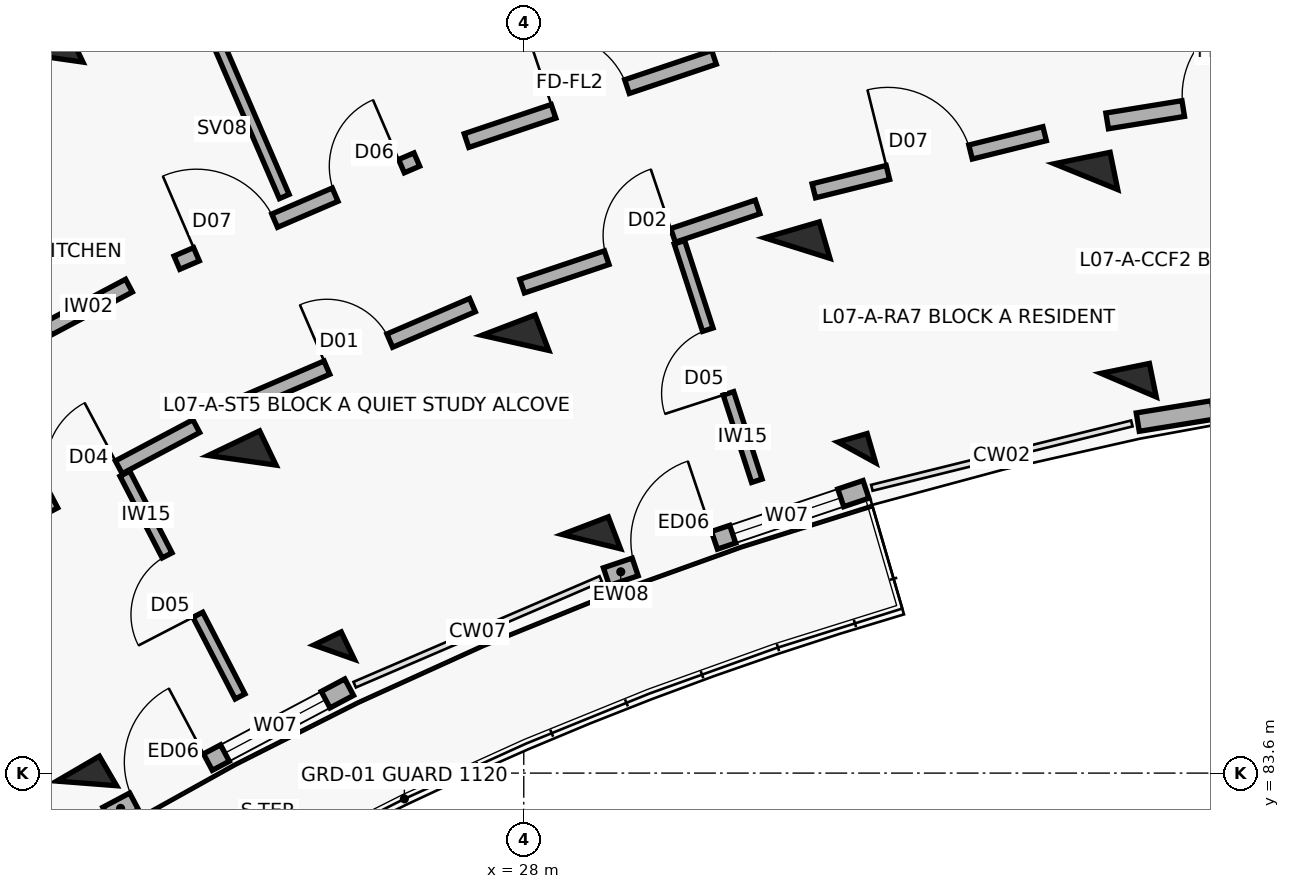
"""IFC4 building model, lengths in metres.
Left out: names, types, materials, properties, quantities, classifications, styles, units other than length and angle.
Written with IfcOpenShell. Run it as: python <this file> out.ifc"""

import sys

from ifc_helpers import new_model, si_unit, direction, frame, frame_2d, origin, origin_2d, place, context, subcontext, project, spatial, rectangle, extrude, element, fill, save


model = new_model("IFC4")
c1 = context("Model", 3, precision=1e-05, world=origin(), true_north=direction((0.0, 1.0)))
c2 = subcontext(c1, "Body", "Model", "MODEL_VIEW")
j1 = project(units=[si_unit("LENGTHUNIT", "METRE"), si_unit("PLANEANGLEUNIT", "RADIAN")], contexts=[c1])
p1 = place(None, origin())
s1 = spatial("IfcSite", under=j1, at=p1, CompositionType="ELEMENT")
p2 = place(p1, origin())
s2 = spatial("IfcBuilding", under=s1, at=p2, CompositionType="ELEMENT")
p3 = place(p2, frame((0.0, 0.0, 23.6)))
s3 = spatial("IfcBuildingStorey", under=s2, at=p3, CompositionType="ELEMENT", Elevation=23.6)
p4 = place(p3, frame((22.249, 83.464, 0.0), z_axis=(0.0, 0.0, 1.0), x_axis=(-0.504226211181, 0.863571611366, 0.0)))
e1 = element("IfcColumn", 1, at=p4, inside=s3, PredefinedType="COLUMN", context=c2, shape_type="SweptSolid", body=[
    extrude(rectangle(XDim=0.45, YDim=0.65, at=origin_2d()), origin(), (0.0, 0.0, 1.0), 3.1),
])
p5 = place(p3, frame((25.504, 85.191, 0.0), z_axis=(0.0, 0.0, 1.0), x_axis=(-0.432085748802, 0.901832526405, 0.0)))
e2 = element("IfcColumn", 2, at=p5, inside=s3, PredefinedType="COLUMN", context=c2, shape_type="SweptSolid", body=[
    extrude(rectangle(XDim=0.4, YDim=0.4, at=origin_2d()), origin(), (0.0, 0.0, 1.0), 3.1),
])
for number, where, z_axis, x_axis in (
    (3, (24.294, 87.716, 0.0), (0.0, 0.0, 1.0), (-0.432, 0.902, 0.0)),
    (4, (21.754, 93.019, 0.0), (0.0, 0.0, 1.0), (-0.432, 0.902, 0.0)),
):
    element("IfcColumn", number, at=place(p3, frame(where, z_axis=z_axis, x_axis=x_axis)), inside=s3, PredefinedType="COLUMN", context=c2, shape_type="SweptSolid", body=[
        extrude(rectangle(XDim=0.5, YDim=0.75, at=origin_2d()), origin(), (0.0, 0.0, 1.0), 3.1),
    ])
p6 = place(p3, frame((28.889, 86.646, 0.0), z_axis=(0.0, 0.0, 1.0), x_axis=(-0.357064076459, 0.934079892355, 0.0)))
e5 = element("IfcColumn", 5, at=p6, inside=s3, PredefinedType="COLUMN", context=c2, shape_type="SweptSolid", body=[
    extrude(rectangle(XDim=0.45, YDim=0.65, at=origin_2d()), origin(), (0.0, 0.0, 1.0), 3.1),
])
p7 = place(p3, frame((27.889, 89.261, 0.0), z_axis=(0.0, 0.0, 1.0), x_axis=(-0.357064076459, 0.934079892355, 0.0)))
e6 = element("IfcColumn", 6, at=p7, inside=s3, PredefinedType="COLUMN", context=c2, shape_type="SweptSolid", body=[
    extrude(rectangle(XDim=0.5, YDim=0.75, at=origin_2d()), origin(), (0.0, 0.0, 1.0), 3.1),
])
p8 = place(p3, frame((32.382, 87.82, 0.0), z_axis=(0.0, 0.0, 1.0), x_axis=(-0.27966144946, 0.96009867914, 0.0)))
e7 = element("IfcColumn", 7, at=p8, inside=s3, PredefinedType="COLUMN", context=c2, shape_type="SweptSolid", body=[
    extrude(rectangle(XDim=0.4, YDim=0.4, at=origin_2d()), origin(), (0.0, 0.0, 1.0), 3.1),
])
p9 = place(p3, frame((31.599, 90.508, 0.0), z_axis=(0.0, 0.0, 1.0), x_axis=(-0.27966144946, 0.96009867914, 0.0)))
e8 = element("IfcColumn", 8, at=p9, inside=s3, PredefinedType="COLUMN", context=c2, shape_type="SweptSolid", body=[
    extrude(rectangle(XDim=0.5, YDim=0.75, at=origin_2d()), origin(), (0.0, 0.0, 1.0), 3.1),
])
p10 = place(p3, frame((35.958, 88.705, 0.0), z_axis=(0.0, 0.0, 1.0), x_axis=(-0.200393999665, 0.979715389742, 0.0)))
e9 = element("IfcColumn", 9, at=p10, inside=s3, PredefinedType="COLUMN", context=c2, shape_type="SweptSolid", body=[
    extrude(rectangle(XDim=0.45, YDim=0.65, at=origin_2d()), origin(), (0.0, 0.0, 1.0), 3.1),
])
p11 = place(p3, frame((35.397, 91.448, 0.0), z_axis=(0.0, 0.0, 1.0), x_axis=(-0.200393999665, 0.979715389742, 0.0)))
e10 = element("IfcColumn", 10, at=p11, inside=s3, PredefinedType="COLUMN", context=c2, shape_type="SweptSolid", body=[
    extrude(rectangle(XDim=0.5, YDim=0.75, at=origin_2d()), origin(), (0.0, 0.0, 1.0), 3.1),
])
p12 = place(p3, frame((22.519, 83.042, 0.0), z_axis=(0.0, 0.0, 1.0), x_axis=(0.883438308286, 0.468547495407, 0.0)))
e11 = element("IfcWall", 11, at=p12, inside=s3, PredefinedType="SOLIDWALL", context=c2, shape_type="SweptSolid", body=[
    extrude(rectangle(XDim=3.604, YDim=0.245, at=frame_2d((1.802, 0.0))), origin(), (0.0, 0.0, 1.0), 2.25),
])
p13 = place(p12, frame((0.4, 0.0, 0.0)))
e12 = element("IfcOpeningElement", 12, at=p13, cuts=e11, PredefinedType="OPENING", context=c2, shape_type="SweptSolid", body=[
    extrude(rectangle(XDim=1.1, YDim=2.15, at=frame_2d((0.55, 1.075))), frame((0.0, 0.133, 0.0), z_axis=(0.0, -1.0, 0.0), x_axis=(1.0, 0.0, 0.0)), (0.0, 0.0, 1.0), 0.265),
])
p14 = place(p12, frame((1.754, 0.0, 0.35)))
e13 = element("IfcOpeningElement", 13, at=p14, cuts=e11, PredefinedType="OPENING", context=c2, shape_type="SweptSolid", body=[
    extrude(rectangle(XDim=1.5, YDim=1.65, at=frame_2d((0.75, 0.825))), frame((0.0, 0.133, 0.0), z_axis=(0.0, -1.0, 0.0), x_axis=(1.0, 0.0, 0.0)), (0.0, 0.0, 1.0), 0.265),
])
p15 = place(p3, frame((29.087, 86.185, 0.0), z_axis=(0.0, 0.0, 1.0), x_axis=(0.947880824442, 0.318625081649, 0.0)))
e14 = element("IfcWall", 14, at=p15, inside=s3, PredefinedType="SOLIDWALL", context=c2, shape_type="SweptSolid", body=[
    extrude(rectangle(XDim=3.604, YDim=0.245, at=frame_2d((1.802, 0.0))), origin(), (0.0, 0.0, 1.0), 2.25),
])
p16 = place(p15, frame((0.4, 0.0, 0.0)))
e15 = element("IfcOpeningElement", 15, at=p16, cuts=e14, PredefinedType="OPENING", context=c2, shape_type="SweptSolid", body=[
    extrude(rectangle(XDim=1.1, YDim=2.15, at=frame_2d((0.55, 1.075))), frame((0.0, 0.133, 0.0), z_axis=(0.0, -1.0, 0.0), x_axis=(1.0, 0.0, 0.0)), (0.0, 0.0, 1.0), 0.265),
])
p17 = place(p15, frame((1.754, 0.0, 0.35)))
e16 = element("IfcOpeningElement", 16, at=p17, cuts=e14, PredefinedType="OPENING", context=c2, shape_type="SweptSolid", body=[
    extrude(rectangle(XDim=1.5, YDim=1.65, at=frame_2d((0.75, 0.825))), frame((0.0, 0.133, 0.0), z_axis=(0.0, -1.0, 0.0), x_axis=(1.0, 0.0, 0.0)), (0.0, 0.0, 1.0), 0.265),
])
p18 = place(p3, frame((36.078, 88.218, 0.0), z_axis=(0.0, 0.0, 1.0), x_axis=(0.987080874485, 0.160222804952, 0.0)))
e17 = element("IfcWall", 17, at=p18, inside=s3, PredefinedType="SOLIDWALL", context=c2, shape_type="SweptSolid", body=[
    extrude(rectangle(XDim=3.604, YDim=0.245, at=frame_2d((1.802, 0.0))), origin(), (0.0, 0.0, 1.0), 2.25),
])
p19 = place(p18, frame((1.002, 0.0, 0.32)))
e18 = element("IfcOpeningElement", 18, at=p19, cuts=e17, PredefinedType="OPENING", context=c2, shape_type="SweptSolid", body=[
    extrude(rectangle(XDim=1.6, YDim=1.5, at=frame_2d((0.8, 0.75))), frame((0.0, 0.133, 0.0), z_axis=(0.0, -1.0, 0.0), x_axis=(1.0, 0.0, 0.0)), (0.0, 0.0, 1.0), 0.265),
])
p20 = place(p3, frame((19.77, 88.404, 0.0), z_axis=(0.0, 0.0, 1.0), x_axis=(0.883410853063, 0.468599258099, 0.0)))
e19 = element("IfcWall", 19, at=p20, inside=s3, PredefinedType="SOLIDWALL", context=c2, shape_type="SweptSolid", body=[
    extrude(rectangle(XDim=3.436, YDim=0.19, at=frame_2d((1.718, 0.0))), origin(), (0.0, 0.0, 1.0), 2.08),
])
p21 = place(p20, frame((1.208, 0.0, 0.0)))
e20 = element("IfcOpeningElement", 20, at=p21, cuts=e19, PredefinedType="OPENING", context=c2, shape_type="SweptSolid", body=[
    extrude(rectangle(XDim=1.02, YDim=2.15, at=frame_2d((0.51, 1.075))), frame((0.0, 0.105, 0.0), z_axis=(0.0, -1.0, 0.0), x_axis=(1.0, 0.0, 0.0)), (0.0, 0.0, 1.0), 0.21),
])
p22 = place(p3, frame((20.804, 86.634, 0.0), z_axis=(0.0, 0.0, 1.0), x_axis=(0.883444301944, 0.468536194293, 0.0)))
e21 = element("IfcWall", 21, at=p22, inside=s3, PredefinedType="SOLIDWALL", context=c2, shape_type="SweptSolid", body=[
    extrude(rectangle(XDim=3.269, YDim=0.19, at=frame_2d((1.634, 0.0))), origin(), (0.0, 0.0, 1.0), 2.08),
])
p23 = place(p22, frame((1.154, 0.0, 0.0)))
e22 = element("IfcOpeningElement", 22, at=p23, cuts=e21, PredefinedType="OPENING", context=c2, shape_type="SweptSolid", body=[
    extrude(rectangle(XDim=0.96, YDim=2.1, at=frame_2d((0.48, 1.05))), frame((0.0, 0.105, 0.0), z_axis=(0.0, -1.0, 0.0), x_axis=(1.0, 0.0, 0.0)), (0.0, 0.0, 1.0), 0.21),
])
p24 = place(p3, frame((24.267, 84.608, 0.0), z_axis=(0.0, 0.0, 1.0), x_axis=(-0.459217611894, 0.888323806349, 0.0)))
e23 = element("IfcWall", 23, at=p24, inside=s3, PredefinedType="PARTITIONING", context=c2, shape_type="SweptSolid", body=[
    extrude(rectangle(XDim=3.3, YDim=0.145, at=frame_2d((1.65, 0.0))), origin(), (0.0, 0.0, 1.0), 2.08),
])
p25 = place(p24, frame((1.21, 0.0, 0.0)))
e24 = element("IfcOpeningElement", 24, at=p25, cuts=e23, PredefinedType="OPENING", context=c2, shape_type="SweptSolid", body=[
    extrude(rectangle(XDim=0.88, YDim=2.1, at=frame_2d((0.44, 1.05))), frame((0.0, 0.083, 0.0), z_axis=(0.0, -1.0, 0.0), x_axis=(1.0, 0.0, 0.0)), (0.0, 0.0, 1.0), 0.165),
])
p26 = place(p3, frame((23.437, 90.316, 0.0), z_axis=(0.0, 0.0, 1.0), x_axis=(0.918718172399, 0.394913813008, 0.0)))
e25 = element("IfcWall", 25, at=p26, inside=s3, PredefinedType="SOLIDWALL", context=c2, shape_type="SweptSolid", body=[
    extrude(rectangle(XDim=3.436, YDim=0.19, at=frame_2d((1.718, 0.0))), origin(), (0.0, 0.0, 1.0), 2.08),
])
p27 = place(p26, frame((0.28, 0.0, 0.0)))
e26 = element("IfcOpeningElement", 26, at=p27, cuts=e25, PredefinedType="OPENING", context=c2, shape_type="SweptSolid", body=[
    extrude(rectangle(XDim=1.12, YDim=2.15, at=frame_2d((0.56, 1.075))), frame((0.0, 0.105, 0.0), z_axis=(0.0, -1.0, 0.0), x_axis=(1.0, 0.0, 0.0)), (0.0, 0.0, 1.0), 0.21),
])
p28 = place(p26, frame((2.266, 0.0, 0.0)))
e27 = element("IfcOpeningElement", 27, at=p28, cuts=e25, PredefinedType="OPENING", context=c2, shape_type="SweptSolid", body=[
    extrude(rectangle(XDim=0.95, YDim=2.1, at=frame_2d((0.475, 1.05))), frame((0.0, 0.105, 0.0), z_axis=(0.0, -1.0, 0.0), x_axis=(1.0, 0.0, 0.0)), (0.0, 0.0, 1.0), 0.21),
])
p29 = place(p3, frame((24.322, 88.467, 0.0), z_axis=(0.0, 0.0, 1.0), x_axis=(0.918723391052, 0.394901672235, 0.0)))
e28 = element("IfcWall", 28, at=p29, inside=s3, PredefinedType="SOLIDWALL", context=c2, shape_type="SweptSolid", body=[
    extrude(rectangle(XDim=3.269, YDim=0.19, at=frame_2d((1.634, 0.0))), origin(), (0.0, 0.0, 1.0), 2.08),
])
p30 = place(p29, frame((1.184, 0.0, 0.0)))
e29 = element("IfcOpeningElement", 29, at=p30, cuts=e28, PredefinedType="OPENING", context=c2, shape_type="SweptSolid", body=[
    extrude(rectangle(XDim=0.9, YDim=2.1, at=frame_2d((0.45, 1.05))), frame((0.0, 0.105, 0.0), z_axis=(0.0, -1.0, 0.0), x_axis=(1.0, 0.0, 0.0)), (0.0, 0.0, 1.0), 0.21),
])
p31 = place(p3, frame((24.849, 91.187, 0.0), z_axis=(0.0, 0.0, 1.0), x_axis=(-0.396278945437, 0.91813016365, 0.0)))
e30 = element("IfcWall", 30, at=p31, inside=s3, PredefinedType="PARTITIONING", context=c2, shape_type="SweptSolid", body=[
    extrude(rectangle(XDim=7.95, YDim=0.14, at=frame_2d((3.975, 0.0))), origin(), (0.0, 0.0, 1.0), 2.08),
])
p32 = place(p31, frame((6.05, 0.0, 0.0)))
e31 = element("IfcOpeningElement", 31, at=p32, cuts=e30, PredefinedType="OPENING", context=c2, shape_type="SweptSolid", body=[
    extrude(rectangle(XDim=0.92, YDim=2.1, at=frame_2d((0.46, 1.05))), frame((0.0, 0.08, 0.0), z_axis=(0.0, -1.0, 0.0), x_axis=(1.0, 0.0, 0.0)), (0.0, 0.0, 1.0), 0.16),
])
p33 = place(p3, frame((27.247, 91.923, 0.0), z_axis=(0.0, 0.0, 1.0), x_axis=(0.947863007629, 0.318678080151, 0.0)))
e32 = element("IfcWall", 32, at=p33, inside=s3, PredefinedType="SOLIDWALL", context=c2, shape_type="SweptSolid", body=[
    extrude(rectangle(XDim=3.436, YDim=0.19, at=frame_2d((1.718, 0.0))), origin(), (0.0, 0.0, 1.0), 2.08),
])
p34 = place(p33, frame((1.208, 0.0, 0.0)))
e33 = element("IfcOpeningElement", 33, at=p34, cuts=e32, PredefinedType="OPENING", context=c2, shape_type="SweptSolid", body=[
    extrude(rectangle(XDim=1.02, YDim=2.15, at=frame_2d((0.51, 1.075))), frame((0.0, 0.105, 0.0), z_axis=(0.0, -1.0, 0.0), x_axis=(1.0, 0.0, 0.0)), (0.0, 0.0, 1.0), 0.21),
])
p35 = place(p3, frame((27.979, 90.008, 0.0), z_axis=(0.0, 0.0, 1.0), x_axis=(0.94787351033, 0.318646839643, 0.0)))
e34 = element("IfcWall", 34, at=p35, inside=s3, PredefinedType="SOLIDWALL", context=c2, shape_type="SweptSolid", body=[
    extrude(rectangle(XDim=3.269, YDim=0.19, at=frame_2d((1.634, 0.0))), origin(), (0.0, 0.0, 1.0), 2.08),
])
p36 = place(p35, frame((1.174, 0.0, 0.0)))
e35 = element("IfcOpeningElement", 35, at=p36, cuts=e34, PredefinedType="OPENING", context=c2, shape_type="SweptSolid", body=[
    extrude(rectangle(XDim=0.92, YDim=2.1, at=frame_2d((0.46, 1.05))), frame((0.0, 0.105, 0.0), z_axis=(0.0, -1.0, 0.0), x_axis=(1.0, 0.0, 0.0)), (0.0, 0.0, 1.0), 0.21),
])
p37 = place(p3, frame((31.066, 87.446, 0.0), z_axis=(0.0, 0.0, 1.0), x_axis=(-0.308582493915, 0.951197584337, 0.0)))
e36 = element("IfcWall", 36, at=p37, inside=s3, PredefinedType="PARTITIONING", context=c2, shape_type="SweptSolid", body=[
    extrude(rectangle(XDim=3.3, YDim=0.145, at=frame_2d((1.65, 0.0))), origin(), (0.0, 0.0, 1.0), 2.08),
])
p38 = place(p37, frame((1.21, 0.0, 0.0)))
e37 = element("IfcOpeningElement", 37, at=p38, cuts=e36, PredefinedType="OPENING", context=c2, shape_type="SweptSolid", body=[
    extrude(rectangle(XDim=0.88, YDim=2.1, at=frame_2d((0.44, 1.05))), frame((0.0, 0.083, 0.0), z_axis=(0.0, -1.0, 0.0), x_axis=(1.0, 0.0, 0.0)), (0.0, 0.0, 1.0), 0.165),
])
p39 = place(p3, frame((31.816, 91.262, 0.0), z_axis=(0.0, 0.0, 1.0), x_axis=(0.970727194092, 0.240184751078, 0.0)))
e38 = element("IfcWall", 38, at=p39, inside=s3, PredefinedType="SOLIDWALL", context=c2, shape_type="SweptSolid", body=[
    extrude(rectangle(XDim=3.129, YDim=0.19, at=frame_2d((1.564, 0.0))), origin(), (0.0, 0.0, 1.0), 2.08),
])
p40 = place(p39, frame((1.004, 0.0, 0.0)))
e39 = element("IfcOpeningElement", 39, at=p40, cuts=e38, PredefinedType="OPENING", context=c2, shape_type="SweptSolid", body=[
    extrude(rectangle(XDim=1.12, YDim=2.15, at=frame_2d((0.56, 1.075))), frame((0.0, 0.105, 0.0), z_axis=(0.0, -1.0, 0.0), x_axis=(1.0, 0.0, 0.0)), (0.0, 0.0, 1.0), 0.21),
])
p41 = place(p3, frame((35.676, 92.181, 0.0), z_axis=(0.0, 0.0, 1.0), x_axis=(0.98707079686, 0.160284877599, 0.0)))
e40 = element("IfcWall", 40, at=p41, inside=s3, PredefinedType="SOLIDWALL", context=c2, shape_type="SweptSolid", body=[
    extrude(rectangle(XDim=3.129, YDim=0.21, at=frame_2d((1.564, 0.0))), origin(), (0.0, 0.0, 1.0), 2.08),
])
p42 = place(p41, frame((1.014, 0.0, 0.0)))
e41 = element("IfcOpeningElement", 41, at=p42, cuts=e40, PredefinedType="OPENING", context=c2, shape_type="SweptSolid", body=[
    extrude(rectangle(XDim=1.1, YDim=2.15, at=frame_2d((0.55, 1.075))), frame((0.0, 0.115, 0.0), z_axis=(0.0, -1.0, 0.0), x_axis=(1.0, 0.0, 0.0)), (0.0, 0.0, 1.0), 0.23),
])
p43 = place(p13, origin())
e42 = element("IfcDoor", 42, at=p43, inside=s3, OperationType="SINGLE_SWING_RIGHT", PredefinedType="DOOR", context=c2, shape_type="SweptSolid", body=[
    extrude(rectangle(XDim=1.1, YDim=2.15, at=frame_2d((0.55, 1.075))), frame((0.0, 0.025, 0.0), z_axis=(0.0, -1.0, 0.0), x_axis=(1.0, 0.0, 0.0)), (0.0, 0.0, 1.0), 0.05),
])
fill(e12, e42)
p44 = place(p14, origin())
e43 = element("IfcWindow", 43, at=p44, inside=s3, PartitioningType="DOUBLE_PANEL_VERTICAL", PredefinedType="WINDOW", context=c2, shape_type="SweptSolid", body=[
    extrude(rectangle(XDim=1.5, YDim=1.65, at=frame_2d((0.75, 0.825))), frame((0.0, 0.03, 0.0), z_axis=(0.0, -1.0, 0.0), x_axis=(1.0, 0.0, 0.0)), (0.0, 0.0, 1.0), 0.06),
])
fill(e13, e43)
p45 = place(p16, origin())
e44 = element("IfcDoor", 44, at=p45, inside=s3, OperationType="SINGLE_SWING_RIGHT", PredefinedType="DOOR", context=c2, shape_type="SweptSolid", body=[
    extrude(rectangle(XDim=1.1, YDim=2.15, at=frame_2d((0.55, 1.075))), frame((0.0, 0.025, 0.0), z_axis=(0.0, -1.0, 0.0), x_axis=(1.0, 0.0, 0.0)), (0.0, 0.0, 1.0), 0.05),
])
fill(e15, e44)
p46 = place(p17, origin())
e45 = element("IfcWindow", 45, at=p46, inside=s3, PartitioningType="DOUBLE_PANEL_VERTICAL", PredefinedType="WINDOW", context=c2, shape_type="SweptSolid", body=[
    extrude(rectangle(XDim=1.5, YDim=1.65, at=frame_2d((0.75, 0.825))), frame((0.0, 0.03, 0.0), z_axis=(0.0, -1.0, 0.0), x_axis=(1.0, 0.0, 0.0)), (0.0, 0.0, 1.0), 0.06),
])
fill(e16, e45)
p47 = place(p23, origin())
e46 = element("IfcDoor", 46, at=p47, inside=s3, OperationType="SINGLE_SWING_RIGHT", PredefinedType="DOOR", context=c2, shape_type="SweptSolid", body=[
    extrude(rectangle(XDim=0.96, YDim=2.1, at=frame_2d((0.48, 1.05))), frame((0.0, 0.025, 0.0), z_axis=(0.0, -1.0, 0.0), x_axis=(1.0, 0.0, 0.0)), (0.0, 0.0, 1.0), 0.05),
])
fill(e22, e46)
p48 = place(p25, origin())
e47 = element("IfcDoor", 47, at=p48, inside=s3, OperationType="SINGLE_SWING_LEFT", PredefinedType="DOOR", context=c2, shape_type="SweptSolid", body=[
    extrude(rectangle(XDim=0.88, YDim=2.1, at=frame_2d((0.44, 1.05))), frame((0.0, 0.025, 0.0), z_axis=(0.0, -1.0, 0.0), x_axis=(1.0, 0.0, 0.0)), (0.0, 0.0, 1.0), 0.05),
])
fill(e24, e47)
p49 = place(p27, origin())
e48 = element("IfcDoor", 48, at=p49, inside=s3, OperationType="SINGLE_SWING_LEFT", PredefinedType="DOOR", context=c2, shape_type="SweptSolid", body=[
    extrude(rectangle(XDim=1.12, YDim=2.15, at=frame_2d((0.56, 1.075))), frame((0.0, 0.025, 0.0), z_axis=(0.0, -1.0, 0.0), x_axis=(1.0, 0.0, 0.0)), (0.0, 0.0, 1.0), 0.05),
])
fill(e26, e48)
p50 = place(p28, origin())
e49 = element("IfcDoor", 49, at=p50, inside=s3, OperationType="SINGLE_SWING_RIGHT", PredefinedType="DOOR", context=c2, shape_type="SweptSolid", body=[
    extrude(rectangle(XDim=0.95, YDim=2.1, at=frame_2d((0.475, 1.05))), frame((0.0, 0.025, 0.0), z_axis=(0.0, -1.0, 0.0), x_axis=(1.0, 0.0, 0.0)), (0.0, 0.0, 1.0), 0.05),
])
fill(e27, e49)
p51 = place(p30, origin())
e50 = element("IfcDoor", 50, at=p51, inside=s3, OperationType="SINGLE_SWING_LEFT", PredefinedType="DOOR", context=c2, shape_type="SweptSolid", body=[
    extrude(rectangle(XDim=0.9, YDim=2.1, at=frame_2d((0.45, 1.05))), frame((0.0, 0.025, 0.0), z_axis=(0.0, -1.0, 0.0), x_axis=(1.0, 0.0, 0.0)), (0.0, 0.0, 1.0), 0.05),
])
fill(e29, e50)
p52 = place(p34, origin())
e51 = element("IfcDoor", 51, at=p52, inside=s3, OperationType="SINGLE_SWING_LEFT", PredefinedType="DOOR", context=c2, shape_type="SweptSolid", body=[
    extrude(rectangle(XDim=1.02, YDim=2.15, at=frame_2d((0.51, 1.075))), frame((0.0, 0.025, 0.0), z_axis=(0.0, -1.0, 0.0), x_axis=(1.0, 0.0, 0.0)), (0.0, 0.0, 1.0), 0.05),
])
fill(e33, e51)
p53 = place(p36, origin())
e52 = element("IfcDoor", 52, at=p53, inside=s3, OperationType="SINGLE_SWING_RIGHT", PredefinedType="DOOR", context=c2, shape_type="SweptSolid", body=[
    extrude(rectangle(XDim=0.92, YDim=2.1, at=frame_2d((0.46, 1.05))), frame((0.0, 0.025, 0.0), z_axis=(0.0, -1.0, 0.0), x_axis=(1.0, 0.0, 0.0)), (0.0, 0.0, 1.0), 0.05),
])
fill(e35, e52)
p54 = place(p38, origin())
e53 = element("IfcDoor", 53, at=p54, inside=s3, OperationType="SINGLE_SWING_LEFT", PredefinedType="DOOR", context=c2, shape_type="SweptSolid", body=[
    extrude(rectangle(XDim=0.88, YDim=2.1, at=frame_2d((0.44, 1.05))), frame((0.0, 0.025, 0.0), z_axis=(0.0, -1.0, 0.0), x_axis=(1.0, 0.0, 0.0)), (0.0, 0.0, 1.0), 0.05),
])
fill(e37, e53)
p55 = place(p40, origin())
e54 = element("IfcDoor", 54, at=p55, inside=s3, OperationType="SINGLE_SWING_LEFT", PredefinedType="DOOR", context=c2, shape_type="SweptSolid", body=[
    extrude(rectangle(XDim=1.12, YDim=2.15, at=frame_2d((0.56, 1.075))), frame((0.0, 0.025, 0.0), z_axis=(0.0, -1.0, 0.0), x_axis=(1.0, 0.0, 0.0)), (0.0, 0.0, 1.0), 0.05),
])
fill(e39, e54)
p56 = place(p42, origin())
e55 = element("IfcDoor", 55, at=p56, inside=s3, OperationType="SINGLE_SWING_RIGHT", PredefinedType="DOOR", context=c2, shape_type="SweptSolid", body=[
    extrude(rectangle(XDim=1.1, YDim=2.15, at=frame_2d((0.55, 1.075))), frame((0.0, 0.025, 0.0), z_axis=(0.0, -1.0, 0.0), x_axis=(1.0, 0.0, 0.0)), (0.0, 0.0, 1.0), 0.05),
])
fill(e41, e55)
save(model, sys.argv[1])
